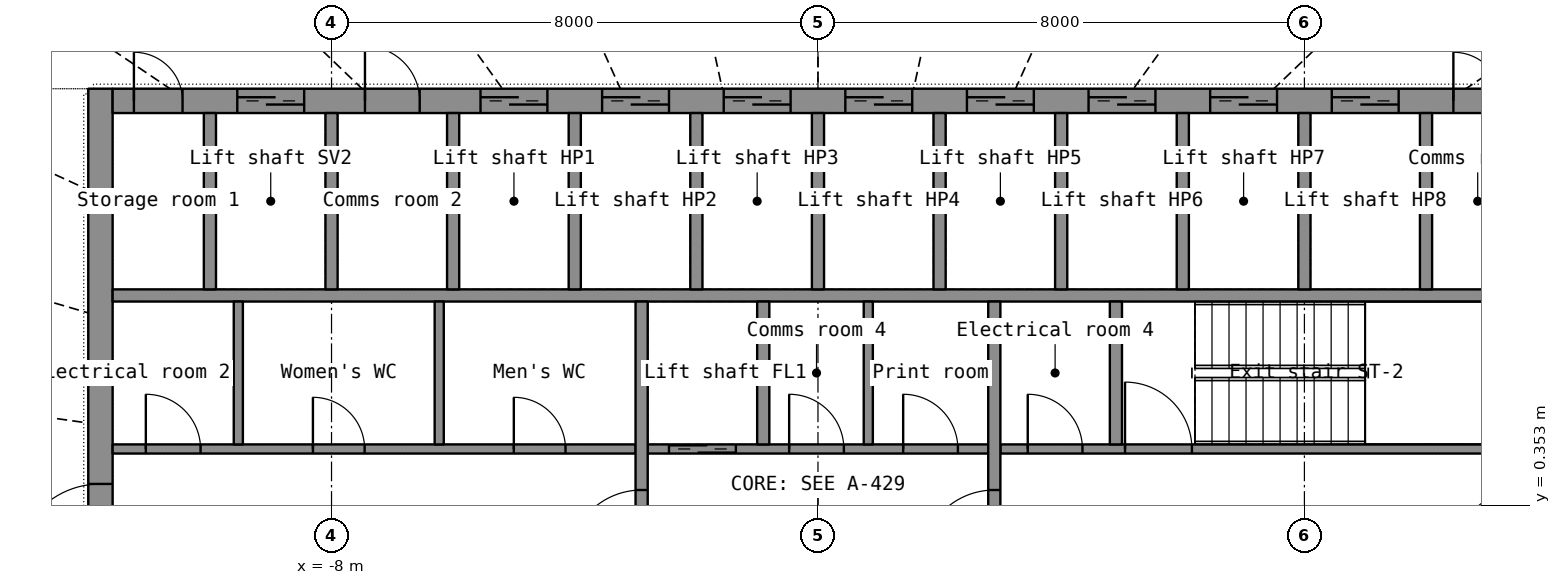
"""IFC4 building model, lengths in metres.
Left out: names, types, materials, properties, quantities, classifications, styles, units other than length and angle.
Written with IfcOpenShell. Run it as: python <this file> out.ifc"""

import sys

from ifc_helpers import new_model, si_unit, direction, frame, frame_2d, origin, place, context, subcontext, project, spatial, rectangle, extrude, element, fill, save


model = new_model("IFC4")
c1 = context("Model", 3, precision=1e-05, world=origin(), true_north=direction((0.0, 1.0)))
c2 = subcontext(c1, "Body", "Model", "MODEL_VIEW")
j1 = project(units=[si_unit("LENGTHUNIT", "METRE"), si_unit("PLANEANGLEUNIT", "RADIAN")], contexts=[c1])
p1 = place(None, origin())
s1 = spatial("IfcSite", under=j1, at=p1, CompositionType="ELEMENT")
p2 = place(p1, origin())
s2 = spatial("IfcBuilding", under=s1, at=p2, CompositionType="ELEMENT")
p3 = place(p2, frame((0.0, 0.0, 220.8)))
s3 = spatial("IfcBuildingStorey", under=s2, at=p3, CompositionType="ELEMENT", Elevation=220.8)
p4 = place(p3, frame((-11.8, -7.2, 0.0), z_axis=(0.0, 0.0, 1.0), x_axis=(0.0, 1.0, 0.0)))
e1 = element("IfcWall", 1, at=p4, inside=s3, PredefinedType="SHEAR", context=c2, shape_type="SweptSolid", body=[
    extrude(rectangle(XDim=14.4, YDim=0.4, at=frame_2d((7.2, 0.0))), origin(), (0.0, 0.0, 1.0), 3.3),
])
p5 = place(p4, frame((6.5, 0.0, 0.0)))
e2 = element("IfcOpeningElement", 2, at=p5, cuts=e1, PredefinedType="OPENING", context=c2, shape_type="SweptSolid", body=[
    extrude(rectangle(XDim=1.4, YDim=2.2, at=frame_2d((0.7, 1.1))), frame((0.0, 0.21, 0.0), z_axis=(0.0, -1.0, 0.0), x_axis=(1.0, 0.0, 0.0)), (0.0, 0.0, 1.0), 0.42),
])
p6 = place(p3, frame((-11.6, 7.0, 0.0), z_axis=(0.0, 0.0, 1.0), x_axis=(1.0, 0.0, 0.0)))
e3 = element("IfcWall", 3, at=p6, inside=s3, PredefinedType="SHEAR", context=c2, shape_type="SweptSolid", body=[
    extrude(rectangle(XDim=23.2, YDim=0.4, at=frame_2d((11.6, 0.0))), origin(), (0.0, 0.0, 1.0), 3.3),
])
p7 = place(p6, frame((2.05, 0.0, 0.0)))
e4 = element("IfcOpeningElement", 4, at=p7, cuts=e3, PredefinedType="OPENING", context=c2, shape_type="SweptSolid", body=[
    extrude(rectangle(XDim=1.1, YDim=2.2, at=frame_2d((0.55, 1.1))), frame((0.0, 0.21, 0.0), z_axis=(0.0, -1.0, 0.0), x_axis=(1.0, 0.0, 0.0)), (0.0, 0.0, 1.0), 0.42),
])
p8 = place(p6, frame((6.05, 0.0, 0.0)))
e5 = element("IfcOpeningElement", 5, at=p8, cuts=e3, PredefinedType="OPENING", context=c2, shape_type="SweptSolid", body=[
    extrude(rectangle(XDim=1.1, YDim=2.2, at=frame_2d((0.55, 1.1))), frame((0.0, 0.21, 0.0), z_axis=(0.0, -1.0, 0.0), x_axis=(1.0, 0.0, 0.0)), (0.0, 0.0, 1.0), 0.42),
])
p9 = place(p6, frame((8.05, 0.0, 0.0)))
e6 = element("IfcOpeningElement", 6, at=p9, cuts=e3, PredefinedType="OPENING", context=c2, shape_type="SweptSolid", body=[
    extrude(rectangle(XDim=1.1, YDim=2.2, at=frame_2d((0.55, 1.1))), frame((0.0, 0.21, 0.0), z_axis=(0.0, -1.0, 0.0), x_axis=(1.0, 0.0, 0.0)), (0.0, 0.0, 1.0), 0.42),
])
p10 = place(p6, frame((10.05, 0.0, 0.0)))
e7 = element("IfcOpeningElement", 7, at=p10, cuts=e3, PredefinedType="OPENING", context=c2, shape_type="SweptSolid", body=[
    extrude(rectangle(XDim=1.1, YDim=2.2, at=frame_2d((0.55, 1.1))), frame((0.0, 0.21, 0.0), z_axis=(0.0, -1.0, 0.0), x_axis=(1.0, 0.0, 0.0)), (0.0, 0.0, 1.0), 0.42),
])
p11 = place(p6, frame((12.05, 0.0, 0.0)))
e8 = element("IfcOpeningElement", 8, at=p11, cuts=e3, PredefinedType="OPENING", context=c2, shape_type="SweptSolid", body=[
    extrude(rectangle(XDim=1.1, YDim=2.2, at=frame_2d((0.55, 1.1))), frame((0.0, 0.21, 0.0), z_axis=(0.0, -1.0, 0.0), x_axis=(1.0, 0.0, 0.0)), (0.0, 0.0, 1.0), 0.42),
])
p12 = place(p6, frame((14.05, 0.0, 0.0)))
e9 = element("IfcOpeningElement", 9, at=p12, cuts=e3, PredefinedType="OPENING", context=c2, shape_type="SweptSolid", body=[
    extrude(rectangle(XDim=1.1, YDim=2.2, at=frame_2d((0.55, 1.1))), frame((0.0, 0.21, 0.0), z_axis=(0.0, -1.0, 0.0), x_axis=(1.0, 0.0, 0.0)), (0.0, 0.0, 1.0), 0.42),
])
p13 = place(p6, frame((16.05, 0.0, 0.0)))
e10 = element("IfcOpeningElement", 10, at=p13, cuts=e3, PredefinedType="OPENING", context=c2, shape_type="SweptSolid", body=[
    extrude(rectangle(XDim=1.1, YDim=2.2, at=frame_2d((0.55, 1.1))), frame((0.0, 0.21, 0.0), z_axis=(0.0, -1.0, 0.0), x_axis=(1.0, 0.0, 0.0)), (0.0, 0.0, 1.0), 0.42),
])
p14 = place(p6, frame((18.05, 0.0, 0.0)))
e11 = element("IfcOpeningElement", 11, at=p14, cuts=e3, PredefinedType="OPENING", context=c2, shape_type="SweptSolid", body=[
    extrude(rectangle(XDim=1.1, YDim=2.2, at=frame_2d((0.55, 1.1))), frame((0.0, 0.21, 0.0), z_axis=(0.0, -1.0, 0.0), x_axis=(1.0, 0.0, 0.0)), (0.0, 0.0, 1.0), 0.42),
])
p15 = place(p6, frame((20.05, 0.0, 0.0)))
e12 = element("IfcOpeningElement", 12, at=p15, cuts=e3, PredefinedType="OPENING", context=c2, shape_type="SweptSolid", body=[
    extrude(rectangle(XDim=1.1, YDim=2.2, at=frame_2d((0.55, 1.1))), frame((0.0, 0.21, 0.0), z_axis=(0.0, -1.0, 0.0), x_axis=(1.0, 0.0, 0.0)), (0.0, 0.0, 1.0), 0.42),
])
p16 = place(p6, frame((4.15, 0.0, 0.0)))
e13 = element("IfcOpeningElement", 13, at=p16, cuts=e3, PredefinedType="OPENING", context=c2, shape_type="SweptSolid", body=[
    extrude(rectangle(XDim=0.9, YDim=2.1, at=frame_2d((0.45, 1.05))), frame((0.0, 0.21, 0.0), z_axis=(0.0, -1.0, 0.0), x_axis=(1.0, 0.0, 0.0)), (0.0, 0.0, 1.0), 0.42),
])
p17 = place(p6, frame((0.35, 0.0, 0.0)))
e14 = element("IfcOpeningElement", 14, at=p17, cuts=e3, PredefinedType="OPENING", context=c2, shape_type="SweptSolid", body=[
    extrude(rectangle(XDim=0.8, YDim=2.05, at=frame_2d((0.4, 1.025))), frame((0.0, 0.21, 0.0), z_axis=(0.0, -1.0, 0.0), x_axis=(1.0, 0.0, 0.0)), (0.0, 0.0, 1.0), 0.42),
])
p18 = place(p6, frame((22.05, 0.0, 0.0)))
e15 = element("IfcOpeningElement", 15, at=p18, cuts=e3, PredefinedType="OPENING", context=c2, shape_type="SweptSolid", body=[
    extrude(rectangle(XDim=0.8, YDim=2.05, at=frame_2d((0.4, 1.025))), frame((0.0, 0.21, 0.0), z_axis=(0.0, -1.0, 0.0), x_axis=(1.0, 0.0, 0.0)), (0.0, 0.0, 1.0), 0.42),
])
p19 = place(p3, frame((-11.6, 3.8, 0.0), z_axis=(0.0, 0.0, 1.0), x_axis=(1.0, 0.0, 0.0)))
e16 = element("IfcWall", 16, at=p19, inside=s3, PredefinedType="SHEAR", context=c2, shape_type="SweptSolid", body=[
    extrude(rectangle(XDim=23.2, YDim=0.2, at=frame_2d((11.6, 0.0))), origin(), (0.0, 0.0, 1.0), 3.3),
])
for number, where, z_axis, x_axis in (
    (17, (-10.0, 3.9, 0.0), (0.0, 0.0, 1.0), (0.0, 1.0, 0.0)),
    (18, (-8.0, 3.9, 0.0), (0.0, 0.0, 1.0), (0.0, 1.0, 0.0)),
    (19, (-6.0, 3.9, 0.0), (0.0, 0.0, 1.0), (0.0, 1.0, 0.0)),
    (20, (-4.0, 3.9, 0.0), (0.0, 0.0, 1.0), (0.0, 1.0, 0.0)),
    (21, (-2.0, 3.9, 0.0), (0.0, 0.0, 1.0), (0.0, 1.0, 0.0)),
    (22, (0.0, 3.9, 0.0), (0.0, 0.0, 1.0), (0.0, 1.0, 0.0)),
    (23, (2.0, 3.9, 0.0), (0.0, 0.0, 1.0), (0.0, 1.0, 0.0)),
    (24, (4.0, 3.9, 0.0), (0.0, 0.0, 1.0), (0.0, 1.0, 0.0)),
    (25, (6.0, 3.9, 0.0), (0.0, 0.0, 1.0), (0.0, 1.0, 0.0)),
    (26, (8.0, 3.9, 0.0), (0.0, 0.0, 1.0), (0.0, 1.0, 0.0)),
    (27, (10.0, 3.9, 0.0), (0.0, 0.0, 1.0), (0.0, 1.0, 0.0)),
):
    element("IfcWall", number, at=place(p3, frame(where, z_axis=z_axis, x_axis=x_axis)), inside=s3, PredefinedType="SHEAR", context=c2, shape_type="SweptSolid", body=[
        extrude(rectangle(XDim=2.9, YDim=0.2, at=frame_2d((1.45, 0.0))), origin(), (0.0, 0.0, 1.0), 3.3),
    ])
p20 = place(p3, frame((-11.6, 1.275, 0.0), z_axis=(0.0, 0.0, 1.0), x_axis=(1.0, 0.0, 0.0)))
e28 = element("IfcWall", 28, at=p20, inside=s3, PredefinedType="PARTITIONING", context=c2, shape_type="SweptSolid", body=[
    extrude(rectangle(XDim=8.6, YDim=0.15, at=frame_2d((4.3, 0.0))), origin(), (0.0, 0.0, 1.0), 3.3),
])
p21 = place(p20, frame((0.546, 0.0, 0.0)))
e29 = element("IfcOpeningElement", 29, at=p21, cuts=e28, PredefinedType="OPENING", context=c2, shape_type="SweptSolid", body=[
    extrude(rectangle(XDim=0.9, YDim=2.1, at=frame_2d((0.45, 1.05))), frame((0.0, 0.085, 0.0), z_axis=(0.0, -1.0, 0.0), x_axis=(1.0, 0.0, 0.0)), (0.0, 0.0, 1.0), 0.17),
])
p22 = place(p20, frame((3.294, 0.0, 0.0)))
e30 = element("IfcOpeningElement", 30, at=p22, cuts=e28, PredefinedType="OPENING", context=c2, shape_type="SweptSolid", body=[
    extrude(rectangle(XDim=0.85, YDim=2.1, at=frame_2d((0.425, 1.05))), frame((0.0, 0.085, 0.0), z_axis=(0.0, -1.0, 0.0), x_axis=(1.0, 0.0, 0.0)), (0.0, 0.0, 1.0), 0.17),
])
p23 = place(p20, frame((6.598, 0.0, 0.0)))
e31 = element("IfcOpeningElement", 31, at=p23, cuts=e28, PredefinedType="OPENING", context=c2, shape_type="SweptSolid", body=[
    extrude(rectangle(XDim=0.85, YDim=2.1, at=frame_2d((0.425, 1.05))), frame((0.0, 0.085, 0.0), z_axis=(0.0, -1.0, 0.0), x_axis=(1.0, 0.0, 0.0)), (0.0, 0.0, 1.0), 0.17),
])
p24 = place(p3, frame((-2.8, 1.275, 0.0), z_axis=(0.0, 0.0, 1.0), x_axis=(1.0, 0.0, 0.0)))
e32 = element("IfcWall", 32, at=p24, inside=s3, PredefinedType="SHEAR", context=c2, shape_type="SweptSolid", body=[
    extrude(rectangle(XDim=5.6, YDim=0.15, at=frame_2d((2.8, 0.0))), origin(), (0.0, 0.0, 1.0), 3.3),
])
p25 = place(p24, frame((0.35, 0.0, 0.0)))
e33 = element("IfcOpeningElement", 33, at=p25, cuts=e32, PredefinedType="OPENING", context=c2, shape_type="SweptSolid", body=[
    extrude(rectangle(XDim=1.1, YDim=2.2, at=frame_2d((0.55, 1.1))), frame((0.0, 0.085, 0.0), z_axis=(0.0, -1.0, 0.0), x_axis=(1.0, 0.0, 0.0)), (0.0, 0.0, 1.0), 0.17),
])
p26 = place(p24, frame((2.326, 0.0, 0.0)))
e34 = element("IfcOpeningElement", 34, at=p26, cuts=e32, PredefinedType="OPENING", context=c2, shape_type="SweptSolid", body=[
    extrude(rectangle(XDim=0.9, YDim=2.1, at=frame_2d((0.45, 1.05))), frame((0.0, 0.085, 0.0), z_axis=(0.0, -1.0, 0.0), x_axis=(1.0, 0.0, 0.0)), (0.0, 0.0, 1.0), 0.17),
])
p27 = place(p24, frame((4.201, 0.0, 0.0)))
e35 = element("IfcOpeningElement", 35, at=p27, cuts=e32, PredefinedType="OPENING", context=c2, shape_type="SweptSolid", body=[
    extrude(rectangle(XDim=0.9, YDim=2.1, at=frame_2d((0.45, 1.05))), frame((0.0, 0.085, 0.0), z_axis=(0.0, -1.0, 0.0), x_axis=(1.0, 0.0, 0.0)), (0.0, 0.0, 1.0), 0.17),
])
p28 = place(p3, frame((3.0, 1.275, 0.0), z_axis=(0.0, 0.0, 1.0), x_axis=(1.0, 0.0, 0.0)))
e36 = element("IfcWall", 36, at=p28, inside=s3, PredefinedType="SHEAR", context=c2, shape_type="SweptSolid", body=[
    extrude(rectangle(XDim=8.6, YDim=0.15, at=frame_2d((4.3, 0.0))), origin(), (0.0, 0.0, 1.0), 3.3),
])
p29 = place(p28, frame((2.05, 0.0, 0.0)))
e37 = element("IfcOpeningElement", 37, at=p29, cuts=e36, PredefinedType="OPENING", context=c2, shape_type="SweptSolid", body=[
    extrude(rectangle(XDim=1.1, YDim=2.15, at=frame_2d((0.55, 1.075))), frame((0.0, 0.085, 0.0), z_axis=(0.0, -1.0, 0.0), x_axis=(1.0, 0.0, 0.0)), (0.0, 0.0, 1.0), 0.17),
])
p30 = place(p28, frame((0.45, 0.0, 0.0)))
e38 = element("IfcOpeningElement", 38, at=p30, cuts=e36, PredefinedType="OPENING", context=c2, shape_type="SweptSolid", body=[
    extrude(rectangle(XDim=0.9, YDim=2.1, at=frame_2d((0.45, 1.05))), frame((0.0, 0.085, 0.0), z_axis=(0.0, -1.0, 0.0), x_axis=(1.0, 0.0, 0.0)), (0.0, 0.0, 1.0), 0.17),
])
p31 = place(p3, frame((-2.9, -3.7, 0.0), z_axis=(0.0, 0.0, 1.0), x_axis=(0.0, 1.0, 0.0)))
e39 = element("IfcWall", 39, at=p31, inside=s3, PredefinedType="SHEAR", context=c2, shape_type="SweptSolid", body=[
    extrude(rectangle(XDim=7.4, YDim=0.2, at=frame_2d((3.7, 0.0))), origin(), (0.0, 0.0, 1.0), 3.3),
])
p32 = place(p31, frame((3.1, 0.0, 0.0)))
e40 = element("IfcOpeningElement", 40, at=p32, cuts=e39, PredefinedType="OPENING", context=c2, shape_type="SweptSolid", body=[
    extrude(rectangle(XDim=1.2, YDim=2.2, at=frame_2d((0.6, 1.1))), frame((0.0, 0.11, 0.0), z_axis=(0.0, -1.0, 0.0), x_axis=(1.0, 0.0, 0.0)), (0.0, 0.0, 1.0), 0.22),
])
p33 = place(p3, frame((2.9, -3.7, 0.0), z_axis=(0.0, 0.0, 1.0), x_axis=(0.0, 1.0, 0.0)))
e41 = element("IfcWall", 41, at=p33, inside=s3, PredefinedType="SHEAR", context=c2, shape_type="SweptSolid", body=[
    extrude(rectangle(XDim=7.4, YDim=0.2, at=frame_2d((3.7, 0.0))), origin(), (0.0, 0.0, 1.0), 3.3),
])
p34 = place(p33, frame((3.1, 0.0, 0.0)))
e42 = element("IfcOpeningElement", 42, at=p34, cuts=e41, PredefinedType="OPENING", context=c2, shape_type="SweptSolid", body=[
    extrude(rectangle(XDim=1.2, YDim=2.2, at=frame_2d((0.6, 1.1))), frame((0.0, 0.11, 0.0), z_axis=(0.0, -1.0, 0.0), x_axis=(1.0, 0.0, 0.0)), (0.0, 0.0, 1.0), 0.22),
])
for number, where, z_axis, x_axis in (
    (43, (-0.9, 1.35, 0.0), (0.0, 0.0, 1.0), (0.0, 1.0, 0.0)),
    (44, (4.9, 1.35, 0.0), (0.0, 0.0, 1.0), (0.0, 1.0, 0.0)),
):
    element("IfcWall", number, at=place(p3, frame(where, z_axis=z_axis, x_axis=x_axis)), inside=s3, PredefinedType="SHEAR", context=c2, shape_type="SweptSolid", body=[
        extrude(rectangle(XDim=2.35, YDim=0.2, at=frame_2d((1.175, 0.0))), origin(), (0.0, 0.0, 1.0), 3.3),
    ])
for number, where, z_axis, x_axis in (
    (45, (-9.533, 1.35, 0.0), (0.0, 0.0, 1.0), (0.0, 1.0, 0.0)),
    (46, (-6.229, 1.35, 0.0), (0.0, 0.0, 1.0), (0.0, 1.0, 0.0)),
    (47, (0.827, 1.35, 0.0), (0.0, 0.0, 1.0), (0.0, 1.0, 0.0)),
):
    element("IfcWall", number, at=place(p3, frame(where, z_axis=z_axis, x_axis=x_axis)), inside=s3, PredefinedType="PARTITIONING", context=c2, shape_type="SweptSolid", body=[
        extrude(rectangle(XDim=2.35, YDim=0.15, at=frame_2d((1.175, 0.0))), origin(), (0.0, 0.0, 1.0), 3.3),
    ])
p35 = place(p7, origin())
e48 = element("IfcDoor", 48, at=p35, inside=s3, OperationType="DOUBLE_DOOR_SLIDING", PredefinedType="DOOR", context=c2, shape_type="SweptSolid", body=[
    extrude(rectangle(XDim=1.1, YDim=2.2, at=frame_2d((0.55, 1.1))), frame((0.0, 0.025, 0.0), z_axis=(0.0, -1.0, 0.0), x_axis=(1.0, 0.0, 0.0)), (0.0, 0.0, 1.0), 0.05),
])
fill(e4, e48)
p36 = place(p8, origin())
e49 = element("IfcDoor", 49, at=p36, inside=s3, OperationType="DOUBLE_DOOR_SLIDING", PredefinedType="DOOR", context=c2, shape_type="SweptSolid", body=[
    extrude(rectangle(XDim=1.1, YDim=2.2, at=frame_2d((0.55, 1.1))), frame((0.0, 0.025, 0.0), z_axis=(0.0, -1.0, 0.0), x_axis=(1.0, 0.0, 0.0)), (0.0, 0.0, 1.0), 0.05),
])
fill(e5, e49)
p37 = place(p9, origin())
e50 = element("IfcDoor", 50, at=p37, inside=s3, OperationType="DOUBLE_DOOR_SLIDING", PredefinedType="DOOR", context=c2, shape_type="SweptSolid", body=[
    extrude(rectangle(XDim=1.1, YDim=2.2, at=frame_2d((0.55, 1.1))), frame((0.0, 0.025, 0.0), z_axis=(0.0, -1.0, 0.0), x_axis=(1.0, 0.0, 0.0)), (0.0, 0.0, 1.0), 0.05),
])
fill(e6, e50)
p38 = place(p10, origin())
e51 = element("IfcDoor", 51, at=p38, inside=s3, OperationType="DOUBLE_DOOR_SLIDING", PredefinedType="DOOR", context=c2, shape_type="SweptSolid", body=[
    extrude(rectangle(XDim=1.1, YDim=2.2, at=frame_2d((0.55, 1.1))), frame((0.0, 0.025, 0.0), z_axis=(0.0, -1.0, 0.0), x_axis=(1.0, 0.0, 0.0)), (0.0, 0.0, 1.0), 0.05),
])
fill(e7, e51)
p39 = place(p11, origin())
e52 = element("IfcDoor", 52, at=p39, inside=s3, OperationType="DOUBLE_DOOR_SLIDING", PredefinedType="DOOR", context=c2, shape_type="SweptSolid", body=[
    extrude(rectangle(XDim=1.1, YDim=2.2, at=frame_2d((0.55, 1.1))), frame((0.0, 0.025, 0.0), z_axis=(0.0, -1.0, 0.0), x_axis=(1.0, 0.0, 0.0)), (0.0, 0.0, 1.0), 0.05),
])
fill(e8, e52)
p40 = place(p12, origin())
e53 = element("IfcDoor", 53, at=p40, inside=s3, OperationType="DOUBLE_DOOR_SLIDING", PredefinedType="DOOR", context=c2, shape_type="SweptSolid", body=[
    extrude(rectangle(XDim=1.1, YDim=2.2, at=frame_2d((0.55, 1.1))), frame((0.0, 0.025, 0.0), z_axis=(0.0, -1.0, 0.0), x_axis=(1.0, 0.0, 0.0)), (0.0, 0.0, 1.0), 0.05),
])
fill(e9, e53)
p41 = place(p13, origin())
e54 = element("IfcDoor", 54, at=p41, inside=s3, OperationType="DOUBLE_DOOR_SLIDING", PredefinedType="DOOR", context=c2, shape_type="SweptSolid", body=[
    extrude(rectangle(XDim=1.1, YDim=2.2, at=frame_2d((0.55, 1.1))), frame((0.0, 0.025, 0.0), z_axis=(0.0, -1.0, 0.0), x_axis=(1.0, 0.0, 0.0)), (0.0, 0.0, 1.0), 0.05),
])
fill(e10, e54)
p42 = place(p14, origin())
e55 = element("IfcDoor", 55, at=p42, inside=s3, OperationType="DOUBLE_DOOR_SLIDING", PredefinedType="DOOR", context=c2, shape_type="SweptSolid", body=[
    extrude(rectangle(XDim=1.1, YDim=2.2, at=frame_2d((0.55, 1.1))), frame((0.0, 0.025, 0.0), z_axis=(0.0, -1.0, 0.0), x_axis=(1.0, 0.0, 0.0)), (0.0, 0.0, 1.0), 0.05),
])
fill(e11, e55)
p43 = place(p15, origin())
e56 = element("IfcDoor", 56, at=p43, inside=s3, OperationType="DOUBLE_DOOR_SLIDING", PredefinedType="DOOR", context=c2, shape_type="SweptSolid", body=[
    extrude(rectangle(XDim=1.1, YDim=2.2, at=frame_2d((0.55, 1.1))), frame((0.0, 0.025, 0.0), z_axis=(0.0, -1.0, 0.0), x_axis=(1.0, 0.0, 0.0)), (0.0, 0.0, 1.0), 0.05),
])
fill(e12, e56)
p44 = place(p16, origin())
e57 = element("IfcDoor", 57, at=p44, inside=s3, OperationType="SINGLE_SWING_LEFT", PredefinedType="DOOR", context=c2, shape_type="SweptSolid", body=[
    extrude(rectangle(XDim=0.9, YDim=2.1, at=frame_2d((0.45, 1.05))), frame((0.0, 0.025, 0.0), z_axis=(0.0, -1.0, 0.0), x_axis=(1.0, 0.0, 0.0)), (0.0, 0.0, 1.0), 0.05),
])
fill(e13, e57)
p45 = place(p17, origin())
e58 = element("IfcDoor", 58, at=p45, inside=s3, OperationType="SINGLE_SWING_LEFT", PredefinedType="DOOR", context=c2, shape_type="SweptSolid", body=[
    extrude(rectangle(XDim=0.8, YDim=2.05, at=frame_2d((0.4, 1.025))), frame((0.0, 0.025, 0.0), z_axis=(0.0, -1.0, 0.0), x_axis=(1.0, 0.0, 0.0)), (0.0, 0.0, 1.0), 0.05),
])
fill(e14, e58)
p46 = place(p18, origin())
e59 = element("IfcDoor", 59, at=p46, inside=s3, OperationType="SINGLE_SWING_LEFT", PredefinedType="DOOR", context=c2, shape_type="SweptSolid", body=[
    extrude(rectangle(XDim=0.8, YDim=2.05, at=frame_2d((0.4, 1.025))), frame((0.0, 0.025, 0.0), z_axis=(0.0, -1.0, 0.0), x_axis=(1.0, 0.0, 0.0)), (0.0, 0.0, 1.0), 0.05),
])
fill(e15, e59)
p47 = place(p5, origin())
e60 = element("IfcDoor", 60, at=p47, inside=s3, OperationType="DOUBLE_DOOR_SINGLE_SWING", PredefinedType="DOOR", context=c2, shape_type="SweptSolid", body=[
    extrude(rectangle(XDim=1.4, YDim=2.2, at=frame_2d((0.7, 1.1))), frame((0.0, 0.025, 0.0), z_axis=(0.0, -1.0, 0.0), x_axis=(1.0, 0.0, 0.0)), (0.0, 0.0, 1.0), 0.05),
])
fill(e2, e60)
p48 = place(p32, origin())
e61 = element("IfcDoor", 61, at=p48, inside=s3, OperationType="SINGLE_SWING_LEFT", PredefinedType="DOOR", context=c2, shape_type="SweptSolid", body=[
    extrude(rectangle(XDim=1.2, YDim=2.2, at=frame_2d((0.6, 1.1))), frame((0.0, 0.025, 0.0), z_axis=(0.0, -1.0, 0.0), x_axis=(1.0, 0.0, 0.0)), (0.0, 0.0, 1.0), 0.05),
])
fill(e40, e61)
p49 = place(p34, origin())
e62 = element("IfcDoor", 62, at=p49, inside=s3, OperationType="SINGLE_SWING_LEFT", PredefinedType="DOOR", context=c2, shape_type="SweptSolid", body=[
    extrude(rectangle(XDim=1.2, YDim=2.2, at=frame_2d((0.6, 1.1))), frame((0.0, 0.025, 0.0), z_axis=(0.0, -1.0, 0.0), x_axis=(1.0, 0.0, 0.0)), (0.0, 0.0, 1.0), 0.05),
])
fill(e42, e62)
p50 = place(p25, origin())
e63 = element("IfcDoor", 63, at=p50, inside=s3, OperationType="DOUBLE_DOOR_SLIDING", PredefinedType="DOOR", context=c2, shape_type="SweptSolid", body=[
    extrude(rectangle(XDim=1.1, YDim=2.2, at=frame_2d((0.55, 1.1))), frame((0.0, 0.025, 0.0), z_axis=(0.0, -1.0, 0.0), x_axis=(1.0, 0.0, 0.0)), (0.0, 0.0, 1.0), 0.05),
])
fill(e33, e63)
p51 = place(p29, origin())
e64 = element("IfcDoor", 64, at=p51, inside=s3, OperationType="SINGLE_SWING_LEFT", PredefinedType="DOOR", context=c2, shape_type="SweptSolid", body=[
    extrude(rectangle(XDim=1.1, YDim=2.15, at=frame_2d((0.55, 1.075))), frame((0.0, 0.025, 0.0), z_axis=(0.0, -1.0, 0.0), x_axis=(1.0, 0.0, 0.0)), (0.0, 0.0, 1.0), 0.05),
])
fill(e37, e64)
p52 = place(p21, origin())
e65 = element("IfcDoor", 65, at=p52, inside=s3, OperationType="SINGLE_SWING_LEFT", PredefinedType="DOOR", context=c2, shape_type="SweptSolid", body=[
    extrude(rectangle(XDim=0.9, YDim=2.1, at=frame_2d((0.45, 1.05))), frame((0.0, 0.025, 0.0), z_axis=(0.0, -1.0, 0.0), x_axis=(1.0, 0.0, 0.0)), (0.0, 0.0, 1.0), 0.05),
])
fill(e29, e65)
p53 = place(p22, origin())
e66 = element("IfcDoor", 66, at=p53, inside=s3, OperationType="SINGLE_SWING_LEFT", PredefinedType="DOOR", context=c2, shape_type="SweptSolid", body=[
    extrude(rectangle(XDim=0.85, YDim=2.1, at=frame_2d((0.425, 1.05))), frame((0.0, 0.025, 0.0), z_axis=(0.0, -1.0, 0.0), x_axis=(1.0, 0.0, 0.0)), (0.0, 0.0, 1.0), 0.05),
])
fill(e30, e66)
p54 = place(p23, origin())
e67 = element("IfcDoor", 67, at=p54, inside=s3, OperationType="SINGLE_SWING_LEFT", PredefinedType="DOOR", context=c2, shape_type="SweptSolid", body=[
    extrude(rectangle(XDim=0.85, YDim=2.1, at=frame_2d((0.425, 1.05))), frame((0.0, 0.025, 0.0), z_axis=(0.0, -1.0, 0.0), x_axis=(1.0, 0.0, 0.0)), (0.0, 0.0, 1.0), 0.05),
])
fill(e31, e67)
p55 = place(p26, origin())
e68 = element("IfcDoor", 68, at=p55, inside=s3, OperationType="SINGLE_SWING_LEFT", PredefinedType="DOOR", context=c2, shape_type="SweptSolid", body=[
    extrude(rectangle(XDim=0.9, YDim=2.1, at=frame_2d((0.45, 1.05))), frame((0.0, 0.025, 0.0), z_axis=(0.0, -1.0, 0.0), x_axis=(1.0, 0.0, 0.0)), (0.0, 0.0, 1.0), 0.05),
])
fill(e34, e68)
p56 = place(p27, origin())
e69 = element("IfcDoor", 69, at=p56, inside=s3, OperationType="SINGLE_SWING_LEFT", PredefinedType="DOOR", context=c2, shape_type="SweptSolid", body=[
    extrude(rectangle(XDim=0.9, YDim=2.1, at=frame_2d((0.45, 1.05))), frame((0.0, 0.025, 0.0), z_axis=(0.0, -1.0, 0.0), x_axis=(1.0, 0.0, 0.0)), (0.0, 0.0, 1.0), 0.05),
])
fill(e35, e69)
p57 = place(p30, origin())
e70 = element("IfcDoor", 70, at=p57, inside=s3, OperationType="SINGLE_SWING_LEFT", PredefinedType="DOOR", context=c2, shape_type="SweptSolid", body=[
    extrude(rectangle(XDim=0.9, YDim=2.1, at=frame_2d((0.45, 1.05))), frame((0.0, 0.025, 0.0), z_axis=(0.0, -1.0, 0.0), x_axis=(1.0, 0.0, 0.0)), (0.0, 0.0, 1.0), 0.05),
])
fill(e38, e70)
save(model, sys.argv[1])
